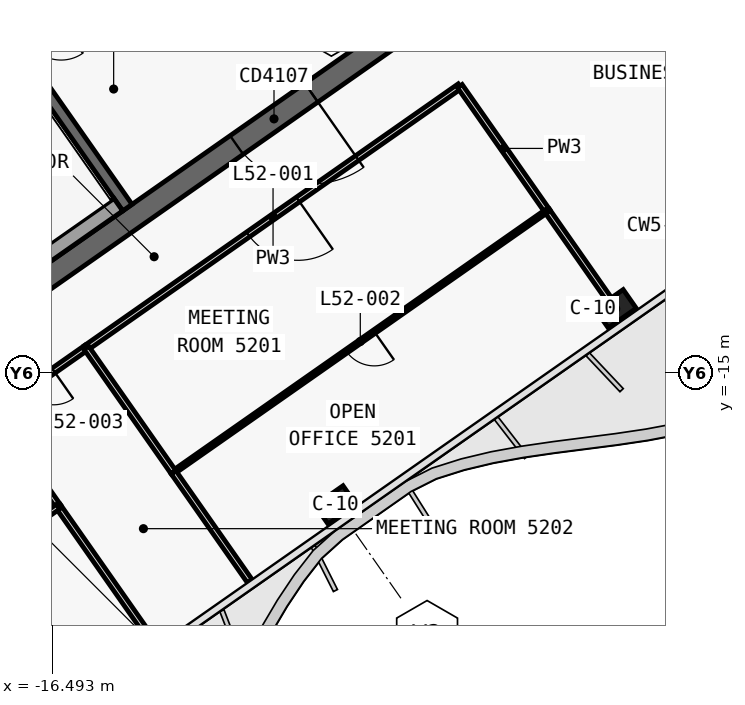
"""IFC4 building model, lengths in metres.
Left out: names, types, materials, properties, quantities, classifications, styles, units other than length and angle.
Written with IfcOpenShell. Run it as: python <this file> out.ifc"""

import sys

from ifc_helpers import new_model, si_unit, direction, frame, frame_2d, origin, origin_2d, place, context, subcontext, project, spatial, polyline, rectangle, outline, extrude, element, fill, save


model = new_model("IFC4")
c1 = context("Model", 3, precision=1e-05, world=origin(), true_north=direction((0.0, 1.0)))
c2 = subcontext(c1, "Body", "Model", "MODEL_VIEW")
j1 = project(units=[si_unit("LENGTHUNIT", "METRE"), si_unit("PLANEANGLEUNIT", "RADIAN")], contexts=[c1])
p1 = place(None, origin())
s1 = spatial("IfcSite", under=j1, at=p1, CompositionType="ELEMENT")
p2 = place(p1, origin())
s2 = spatial("IfcBuilding", under=s1, at=p2, CompositionType="ELEMENT")
p3 = place(p2, frame((0.0, 0.0, 225.4)))
s3 = spatial("IfcBuildingStorey", under=s2, at=p3, CompositionType="ELEMENT", Elevation=225.4)
p4 = place(p3, frame((-0.028, 12.066, 0.0), z_axis=(0.0, 0.0, 1.0), x_axis=(-0.819151382952, -0.573577380837, 0.0)))
e1 = element("IfcWall", 1, at=p4, inside=s3, PredefinedType="SHEAR", context=c2, shape_type="SweptSolid", body=[
    extrude(outline(polyline([(33.898, 0.3), (0.42, 0.3), (0.0, -0.3), (33.898, -0.3), (33.898, 0.3)])), origin(), (0.0, 0.0, 1.0), 3.9),
])
p5 = place(p3, frame((-0.028, -0.874, 0.0), z_axis=(0.0, 0.0, 1.0), x_axis=(-0.819150035022, -0.573579305871, 0.0)))
e2 = element("IfcWall", 2, at=p5, inside=s3, PredefinedType="SHEAR", context=c2, shape_type="SweptSolid", body=[
    extrude(outline(polyline([(26.476, 0.3), (0.42, 0.3), (0.0, -0.3), (26.476, -0.3), (26.476, 0.3)])), origin(), (0.0, 0.0, 1.0), 3.9),
])
p6 = place(p5, frame((2.976, 0.0, 0.0)))
e3 = element("IfcOpeningElement", 3, at=p6, cuts=e2, PredefinedType="OPENING", context=c2, shape_type="SweptSolid", body=[
    extrude(rectangle(XDim=2.4, YDim=2.1, at=frame_2d((1.2, 1.05))), frame((0.0, 0.31, 0.0), z_axis=(0.0, -1.0, 0.0), x_axis=(1.0, 0.0, 0.0)), (0.0, 0.0, 1.0), 0.62),
])
p7 = place(p5, frame((11.776, 0.0, 0.0)))
e4 = element("IfcOpeningElement", 4, at=p7, cuts=e2, PredefinedType="OPENING", context=c2, shape_type="SweptSolid", body=[
    extrude(rectangle(XDim=2.4, YDim=2.1, at=frame_2d((1.2, 1.05))), frame((0.0, 0.31, 0.0), z_axis=(0.0, -1.0, 0.0), x_axis=(1.0, 0.0, 0.0)), (0.0, 0.0, 1.0), 0.62),
])
p8 = place(p3, frame((-14.515, -10.652, 0.0), z_axis=(0.0, 0.0, 1.0), x_axis=(-0.573560315113, 0.819163332265, 0.0)))
e5 = element("IfcWall", 5, at=p8, inside=s3, PredefinedType="SHEAR", context=c2, shape_type="SweptSolid", body=[
    extrude(outline(polyline([(4.85, 0.15), (0.0, 0.15), (0.0, -0.15), (4.85, -0.15), (4.85, 0.15)])), origin(), (0.0, 0.0, 1.0), 3.9),
])
p9 = place(p3, frame((-2.638, 3.768, 0.0), z_axis=(0.0, 0.0, 1.0), x_axis=(-0.819155014212, -0.573572194837, 0.0)))
e6 = element("IfcWall", 6, at=p9, inside=s3, PredefinedType="SHEAR", context=c2, shape_type="SweptSolid", body=[
    extrude(outline(polyline([(26.4, 0.15), (0.0, 0.15), (0.0, -0.15), (26.4, -0.15), (26.4, 0.15)])), origin(), (0.0, 0.0, 1.0), 3.9),
])
p10 = place(p9, frame((1.169, 0.0, 0.0)))
e7 = element("IfcOpeningElement", 7, at=p10, cuts=e6, PredefinedType="OPENING", context=c2, shape_type="SweptSolid", body=[
    extrude(rectangle(XDim=1.1, YDim=2.1, at=frame_2d((0.55, 1.05))), frame((0.0, 0.16, 0.0), z_axis=(0.0, -1.0, 0.0), x_axis=(1.0, 0.0, 0.0)), (0.0, 0.0, 1.0), 0.32),
])
p11 = place(p9, frame((3.206, 0.0, 0.0)))
e8 = element("IfcOpeningElement", 8, at=p11, cuts=e6, PredefinedType="OPENING", context=c2, shape_type="SweptSolid", body=[
    extrude(rectangle(XDim=1.1, YDim=2.1, at=frame_2d((0.55, 1.05))), frame((0.0, 0.16, 0.0), z_axis=(0.0, -1.0, 0.0), x_axis=(1.0, 0.0, 0.0)), (0.0, 0.0, 1.0), 0.32),
])
p12 = place(p9, frame((5.244, 0.0, 0.0)))
e9 = element("IfcOpeningElement", 9, at=p12, cuts=e6, PredefinedType="OPENING", context=c2, shape_type="SweptSolid", body=[
    extrude(rectangle(XDim=1.1, YDim=2.1, at=frame_2d((0.55, 1.05))), frame((0.0, 0.16, 0.0), z_axis=(0.0, -1.0, 0.0), x_axis=(1.0, 0.0, 0.0)), (0.0, 0.0, 1.0), 0.32),
])
p13 = place(p9, frame((7.281, 0.0, 0.0)))
e10 = element("IfcOpeningElement", 10, at=p13, cuts=e6, PredefinedType="OPENING", context=c2, shape_type="SweptSolid", body=[
    extrude(rectangle(XDim=1.1, YDim=2.1, at=frame_2d((0.55, 1.05))), frame((0.0, 0.16, 0.0), z_axis=(0.0, -1.0, 0.0), x_axis=(1.0, 0.0, 0.0)), (0.0, 0.0, 1.0), 0.32),
])
p14 = place(p9, frame((9.688, 0.0, 0.0)))
e11 = element("IfcOpeningElement", 11, at=p14, cuts=e6, PredefinedType="OPENING", context=c2, shape_type="SweptSolid", body=[
    extrude(rectangle(XDim=1.1, YDim=2.1, at=frame_2d((0.55, 1.05))), frame((0.0, 0.16, 0.0), z_axis=(0.0, -1.0, 0.0), x_axis=(1.0, 0.0, 0.0)), (0.0, 0.0, 1.0), 0.32),
])
p15 = place(p9, frame((11.863, 0.0, 0.0)))
e12 = element("IfcOpeningElement", 12, at=p15, cuts=e6, PredefinedType="OPENING", context=c2, shape_type="SweptSolid", body=[
    extrude(rectangle(XDim=1.1, YDim=2.1, at=frame_2d((0.55, 1.05))), frame((0.0, 0.16, 0.0), z_axis=(0.0, -1.0, 0.0), x_axis=(1.0, 0.0, 0.0)), (0.0, 0.0, 1.0), 0.32),
])
p16 = place(p9, frame((14.552, 0.0, 0.0)))
e13 = element("IfcOpeningElement", 13, at=p16, cuts=e6, PredefinedType="OPENING", context=c2, shape_type="SweptSolid", body=[
    extrude(rectangle(XDim=1.0, YDim=2.1, at=frame_2d((0.5, 1.05))), frame((0.0, 0.16, 0.0), z_axis=(0.0, -1.0, 0.0), x_axis=(1.0, 0.0, 0.0)), (0.0, 0.0, 1.0), 0.32),
])
p17 = place(p9, frame((16.627, 0.0, 0.0)))
e14 = element("IfcOpeningElement", 14, at=p17, cuts=e6, PredefinedType="OPENING", context=c2, shape_type="SweptSolid", body=[
    extrude(rectangle(XDim=1.0, YDim=2.1, at=frame_2d((0.5, 1.05))), frame((0.0, 0.16, 0.0), z_axis=(0.0, -1.0, 0.0), x_axis=(1.0, 0.0, 0.0)), (0.0, 0.0, 1.0), 0.32),
])
for number, where, z_axis, x_axis in (
    (15, (-1.665, -13.313, 0.0), (0.0, 0.0, 1.0), (-0.819, -0.574, 0.0)),
    (16, (-9.038, -18.475, 0.0), (0.0, 0.0, 1.0), (-0.819, -0.574, 0.0)),
):
    element("IfcColumn", number, at=place(p3, frame(where, z_axis=z_axis, x_axis=x_axis)), inside=s3, PredefinedType="COLUMN", context=c2, shape_type="SweptSolid", body=[
        extrude(rectangle(XDim=0.9, YDim=0.6, at=origin_2d()), origin(), (0.0, 0.0, 1.0), 3.9),
    ])
p18 = place(p3, frame((-14.753, -10.574, 0.0), z_axis=(0.0, 0.0, 1.0), x_axis=(-0.819158229677, -0.573567602601, 0.0)))
e17 = element("IfcWall", 17, at=p18, inside=s3, PredefinedType="SOLIDWALL", context=c2, shape_type="SweptSolid", body=[
    extrude(rectangle(XDim=8.25, YDim=0.4, at=frame_2d((4.125, 0.0))), origin(), (0.0, 0.0, 1.0), 3.62),
])
p19 = place(p3, frame((-5.766, -7.456, 0.0), z_axis=(0.0, 0.0, 1.0), x_axis=(-0.81915546166, -0.573571555809, 0.0)))
e18 = element("IfcWall", 18, at=p19, inside=s3, PredefinedType="PARTITIONING", context=c2, shape_type="SweptSolid", body=[
    extrude(rectangle(XDim=12.002, YDim=0.15, at=frame_2d((6.001, 0.0))), origin(), (0.0, 0.0, 1.0), 3.05),
])
p20 = place(p19, frame((5.201, 0.0, 0.0)))
e19 = element("IfcOpeningElement", 19, at=p20, cuts=e18, PredefinedType="OPENING", context=c2, shape_type="SweptSolid", body=[
    extrude(rectangle(XDim=1.6, YDim=2.1, at=frame_2d((0.8, 1.05))), frame((0.0, 0.085, 0.0), z_axis=(0.0, -1.0, 0.0), x_axis=(1.0, 0.0, 0.0)), (0.0, 0.0, 1.0), 0.17),
])
p21 = place(p3, frame((-15.594, -14.338, 0.0), z_axis=(0.0, 0.0, 1.0), x_axis=(-0.819193738533, -0.573516886193, 0.0)))
e20 = element("IfcWall", 20, at=p21, inside=s3, PredefinedType="PARTITIONING", context=c2, shape_type="SweptSolid", body=[
    extrude(rectangle(XDim=3.004, YDim=0.15, at=frame_2d((1.502, 0.0))), origin(), (0.0, 0.0, 1.0), 3.62),
])
p22 = place(p21, frame((1.052, 0.0, 0.0)))
e21 = element("IfcOpeningElement", 21, at=p22, cuts=e20, PredefinedType="OPENING", context=c2, shape_type="SweptSolid", body=[
    extrude(rectangle(XDim=0.9, YDim=2.1, at=frame_2d((0.45, 1.05))), frame((0.0, 0.085, 0.0), z_axis=(0.0, -1.0, 0.0), x_axis=(1.0, 0.0, 0.0)), (0.0, 0.0, 1.0), 0.17),
])
p23 = place(p3, frame((-1.849, -13.051, 0.0), z_axis=(0.0, 0.0, 1.0), x_axis=(-0.57360125079, 0.819134668472, 0.0)))
e22 = element("IfcWall", 22, at=p23, inside=s3, PredefinedType="PARTITIONING", context=c2, shape_type="SweptSolid", body=[
    extrude(rectangle(XDim=2.831, YDim=0.15, at=frame_2d((1.416, 0.0))), origin(), (0.0, 0.0, 1.0), 3.05),
])
p24 = place(p3, frame((-3.471, -10.734, 0.0), z_axis=(0.0, 0.0, 1.0), x_axis=(-0.573564642091, 0.819160302593, 0.0)))
e23 = element("IfcWall", 23, at=p24, inside=s3, PredefinedType="PARTITIONING", context=c2, shape_type="SweptSolid", body=[
    extrude(rectangle(XDim=4.004, YDim=0.15, at=frame_2d((2.002, 0.0))), origin(), (0.0, 0.0, 1.0), 3.05),
])
p25 = place(p3, frame((-3.471, -10.733, 0.0), z_axis=(0.0, 0.0, 1.0), x_axis=(-0.819146845232, -0.573583861302, 0.0)))
e24 = element("IfcWall", 24, at=p25, inside=s3, PredefinedType="PARTITIONING", context=c2, shape_type="SweptSolid", body=[
    extrude(rectangle(XDim=12.0, YDim=0.1, at=frame_2d((6.0, 0.0))), origin(), (0.0, 0.0, 1.0), 3.05),
])
p26 = place(p25, frame((5.55, 0.0, 0.0)))
e25 = element("IfcOpeningElement", 25, at=p26, cuts=e24, PredefinedType="OPENING", context=c2, shape_type="SweptSolid", body=[
    extrude(rectangle(XDim=0.9, YDim=2.1, at=frame_2d((0.45, 1.05))), frame((0.0, 0.06, 0.0), z_axis=(0.0, -1.0, 0.0), x_axis=(1.0, 0.0, 0.0)), (0.0, 0.0, 1.0), 0.12),
])
p27 = place(p3, frame((-11.294, -20.482, 0.0), z_axis=(0.0, 0.0, 1.0), x_axis=(-0.573555999232, 0.819166354134, 0.0)))
e26 = element("IfcWall", 26, at=p27, inside=s3, PredefinedType="PARTITIONING", context=c2, shape_type="SweptSolid", body=[
    extrude(rectangle(XDim=3.499, YDim=0.15, at=frame_2d((1.75, 0.0))), origin(), (0.0, 0.0, 1.0), 3.0),
])
p28 = place(p3, frame((-13.302, -17.615, 0.0), z_axis=(0.0, 0.0, 1.0), x_axis=(-0.573556557423, 0.819165963305, 0.0)))
e27 = element("IfcWall", 27, at=p28, inside=s3, PredefinedType="PARTITIONING", context=c2, shape_type="SweptSolid", body=[
    extrude(rectangle(XDim=4.0, YDim=0.15, at=frame_2d((2.0, 0.0))), origin(), (0.0, 0.0, 1.0), 3.62),
])
p29 = place(p3, frame((-16.332, -18.519, 0.0), z_axis=(0.0, 0.0, 1.0), x_axis=(-0.573604249862, 0.819132568355, 0.0)))
e28 = element("IfcWall", 28, at=p29, inside=s3, PredefinedType="PARTITIONING", context=c2, shape_type="SweptSolid", body=[
    extrude(rectangle(XDim=3.002, YDim=0.15, at=frame_2d((1.501, 0.0))), origin(), (0.0, 0.0, 1.0), 3.62),
])
p30 = place(p3, frame((-13.752, -22.203, 0.0), z_axis=(0.0, 0.0, 1.0), x_axis=(-0.573593387921, 0.81914017441, 0.0)))
e29 = element("IfcWall", 29, at=p30, inside=s3, PredefinedType="PARTITIONING", context=c2, shape_type="SweptSolid", body=[
    extrude(rectangle(XDim=4.501, YDim=0.15, at=frame_2d((2.25, 0.0))), origin(), (0.0, 0.0, 1.0), 3.0),
])
p31 = place(p3, frame((-16.333, -18.517, 0.0), z_axis=(0.0, 0.0, 1.0), x_axis=(-0.819130592339, -0.573607071691, 0.0)))
e30 = element("IfcWall", 30, at=p31, inside=s3, PredefinedType="PARTITIONING", context=c2, shape_type="SweptSolid", body=[
    extrude(rectangle(XDim=6.0, YDim=0.15, at=frame_2d((3.0, 0.0))), origin(), (0.0, 0.0, 1.0), 3.05),
])
p32 = place(p7, origin())
e31 = element("IfcDoor", 31, at=p32, inside=s3, OperationType="DOUBLE_DOOR_SINGLE_SWING", PredefinedType="DOOR", context=c2, shape_type="SweptSolid", body=[
    extrude(rectangle(XDim=2.4, YDim=2.1, at=frame_2d((1.2, 1.05))), frame((0.0, 0.025, 0.0), z_axis=(0.0, -1.0, 0.0), x_axis=(1.0, 0.0, 0.0)), (0.0, 0.0, 1.0), 0.05),
])
fill(e4, e31)
p33 = place(p20, origin())
e32 = element("IfcDoor", 32, at=p33, inside=s3, OperationType="DOUBLE_DOOR_SINGLE_SWING", PredefinedType="DOOR", context=c2, shape_type="SweptSolid", body=[
    extrude(rectangle(XDim=1.6, YDim=2.1, at=frame_2d((0.8, 1.05))), frame((0.0, 0.025, 0.0), z_axis=(0.0, -1.0, 0.0), x_axis=(1.0, 0.0, 0.0)), (0.0, 0.0, 1.0), 0.05),
])
fill(e19, e32)
p34 = place(p26, origin())
e33 = element("IfcDoor", 33, at=p34, inside=s3, OperationType="SINGLE_SWING_RIGHT", PredefinedType="DOOR", context=c2, shape_type="SweptSolid", body=[
    extrude(rectangle(XDim=0.9, YDim=2.1, at=frame_2d((0.45, 1.05))), frame((0.0, 0.025, 0.0), z_axis=(0.0, -1.0, 0.0), x_axis=(1.0, 0.0, 0.0)), (0.0, 0.0, 1.0), 0.05),
])
fill(e25, e33)
p35 = place(p22, origin())
e34 = element("IfcDoor", 34, at=p35, inside=s3, OperationType="SINGLE_SWING_RIGHT", PredefinedType="DOOR", context=c2, shape_type="SweptSolid", body=[
    extrude(rectangle(XDim=0.9, YDim=2.1, at=frame_2d((0.45, 1.05))), frame((0.0, 0.025, 0.0), z_axis=(0.0, -1.0, 0.0), x_axis=(1.0, 0.0, 0.0)), (0.0, 0.0, 1.0), 0.05),
])
fill(e21, e34)
save(model, sys.argv[1])
